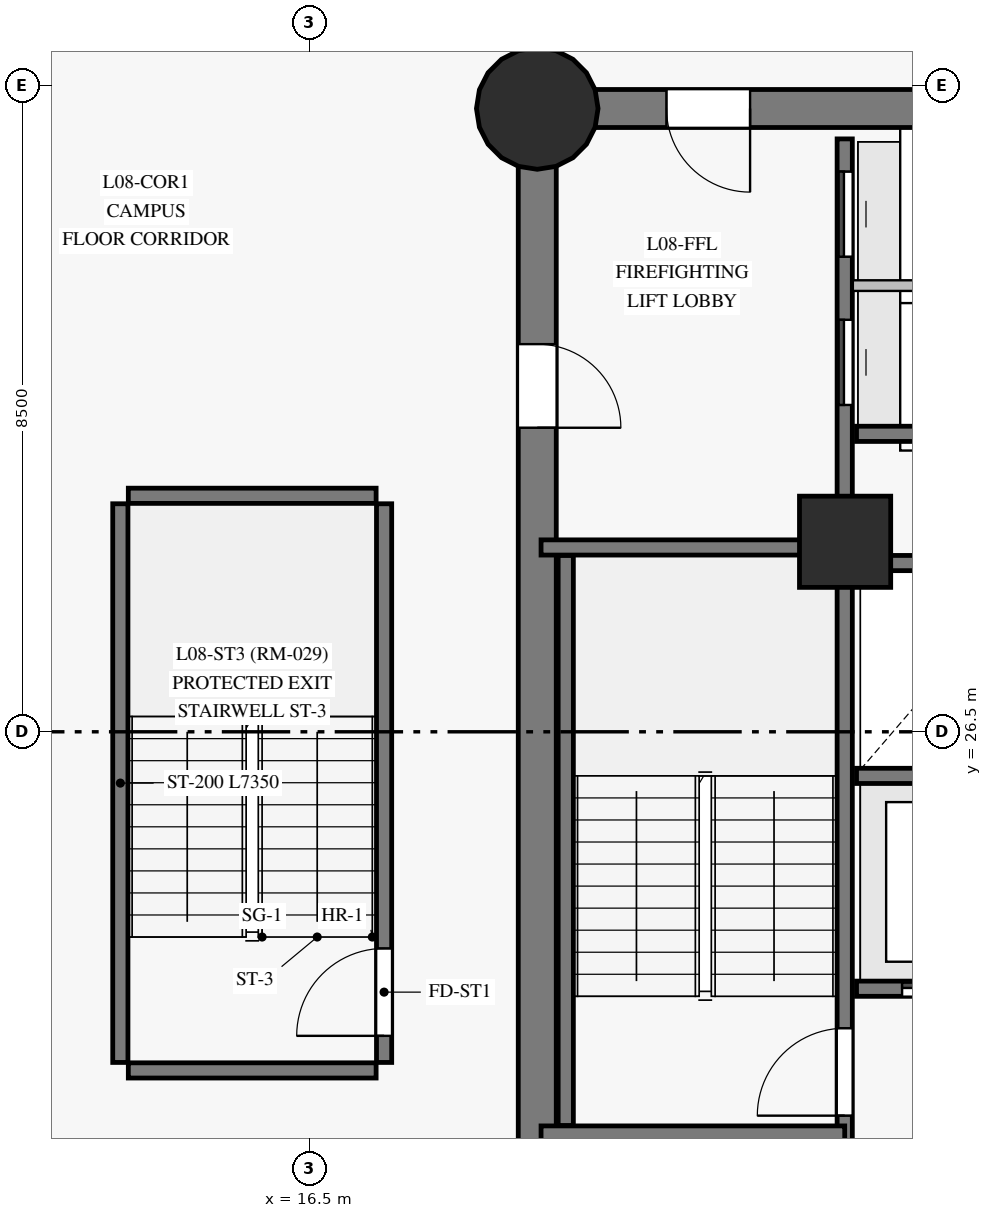
"""IFC4 building model, lengths in metres.
Left out: names, types, materials, properties, quantities, classifications, styles, units other than length and angle.
Written with IfcOpenShell. Run it as: python <this file> out.ifc"""

import sys

from ifc_helpers import new_model, si_unit, direction, frame, frame_2d, origin, origin_with_axes, origin_2d, place, context, subcontext, project, spatial, rectangle, circle, extrude, source, transform, mapped, element, fill, save


model = new_model("IFC4")
c1 = context("Model", 3, precision=1e-05, world=origin(), true_north=direction((0.0, 1.0)))
c2 = subcontext(c1, "Body", "Model", "MODEL_VIEW")
j1 = project(units=[si_unit("LENGTHUNIT", "METRE"), si_unit("PLANEANGLEUNIT", "RADIAN")], contexts=[c1])
p1 = place(None, origin())
s1 = spatial("IfcSite", under=j1, at=p1, CompositionType="ELEMENT")
p2 = place(p1, origin())
s2 = spatial("IfcBuilding", under=s1, at=p2, CompositionType="ELEMENT")
p3 = place(p2, frame((0.0, 0.0, 33.7)))
s3 = spatial("IfcBuildingStorey", under=s2, at=p3, CompositionType="ELEMENT", Elevation=33.7)
p4 = place(p3, frame((26.55, 34.7, 0.0), z_axis=(0.0, 0.0, 1.0), x_axis=(-1.0, 0.0, 0.0)))
e1 = element("IfcWall", 1, at=p4, inside=s3, PredefinedType="SHEAR", context=c2, shape_type="SweptSolid", body=[
    extrude(rectangle(XDim=7.05, YDim=0.5, at=frame_2d((3.525, 0.0))), origin(), (0.0, 0.0, 1.0), 3.35),
])
p5 = place(p4, frame((4.25, 0.0, 0.0)))
e2 = element("IfcOpeningElement", 2, at=p5, cuts=e1, PredefinedType="OPENING", context=c2, shape_type="SweptSolid", body=[
    extrude(rectangle(XDim=1.1, YDim=2.15, at=frame_2d((0.55, 1.075))), frame((0.0, 0.26, 0.0), z_axis=(0.0, -1.0, 0.0), x_axis=(1.0, 0.0, 0.0)), (0.0, 0.0, 1.0), 0.52),
])
p6 = place(p3, frame((19.5, 34.7, 0.0), z_axis=(0.0, 0.0, 1.0), x_axis=(0.0, -1.0, 0.0)))
e3 = element("IfcWall", 3, at=p6, inside=s3, PredefinedType="SHEAR", context=c2, shape_type="SweptSolid", body=[
    extrude(rectangle(XDim=16.4, YDim=0.5, at=frame_2d((8.2, 0.0))), origin(), (0.0, 0.0, 1.0), 3.35),
])
p7 = place(p6, frame((3.1, 0.0, 0.0)))
e4 = element("IfcOpeningElement", 4, at=p7, cuts=e3, PredefinedType="OPENING", context=c2, shape_type="SweptSolid", body=[
    extrude(rectangle(XDim=1.1, YDim=2.15, at=frame_2d((0.55, 1.075))), frame((0.0, 0.26, 0.0), z_axis=(0.0, -1.0, 0.0), x_axis=(1.0, 0.0, 0.0)), (0.0, 0.0, 1.0), 0.52),
])
m1 = source(origin_with_axes(), c2, "Body", "SweptSolid", [
    extrude(circle(Radius=0.8, at=origin_2d()), origin(), (0.0, 0.0, 1.0), 3.6),
])
p8 = place(p3, frame((19.5, 34.7, 0.0), z_axis=(0.0, 0.0, 1.0), x_axis=(1.0, 0.0, 0.0)))
e5 = element("IfcColumn", 5, at=p8, inside=s3, PredefinedType="COLUMN", context=c2, shape_type="MappedRepresentation", body=[
    mapped(m1, transform((0.0, 0.0, 0.0), scale=1.0)),
])
m2 = source(origin_with_axes(), c2, "Body", "SweptSolid", [
    extrude(rectangle(XDim=1.2, YDim=1.2, at=origin_2d()), origin(), (0.0, 0.0, 1.0), 3.6),
])
p9 = place(p3, frame((23.55, 29.0, 0.0), z_axis=(0.0, 0.0, 1.0), x_axis=(1.0, 0.0, 0.0)))
e6 = element("IfcColumn", 6, at=p9, inside=s3, PredefinedType="COLUMN", context=c2, shape_type="MappedRepresentation", body=[
    mapped(m2, transform((0.0, 0.0, 0.0), scale=1.0)),
])
p10 = place(p3, frame((23.545, 18.7, 0.0), z_axis=(0.0, 0.0, 1.0), x_axis=(0.0, 1.0, 0.0)))
e7 = element("IfcWall", 7, at=p10, inside=s3, PredefinedType="SHEAR", context=c2, shape_type="SweptSolid", body=[
    extrude(rectangle(XDim=15.6, YDim=0.2, at=frame_2d((7.8, 0.0))), origin(), (0.0, 0.0, 1.0), 3.35),
])
p11 = place(p10, frame((2.75, 0.0, 0.0)))
e8 = element("IfcOpeningElement", 8, at=p11, cuts=e7, PredefinedType="OPENING", context=c2, shape_type="SweptSolid", body=[
    extrude(rectangle(XDim=1.15, YDim=2.15, at=frame_2d((0.575, 1.075))), frame((0.0, 0.11, 0.0), z_axis=(0.0, -1.0, 0.0), x_axis=(1.0, 0.0, 0.0)), (0.0, 0.0, 1.0), 0.22),
])
p12 = place(p10, frame((0.14, 0.0, 0.0)))
e9 = element("IfcOpeningElement", 9, at=p12, cuts=e7, PredefinedType="OPENING", context=c2, shape_type="SweptSolid", body=[
    extrude(rectangle(XDim=0.88, YDim=2.1, at=frame_2d((0.44, 1.05))), frame((0.0, 0.11, 0.0), z_axis=(0.0, -1.0, 0.0), x_axis=(1.0, 0.0, 0.0)), (0.0, 0.0, 1.0), 0.22),
])
p13 = place(p10, frame((1.36, 0.0, 0.0)))
e10 = element("IfcOpeningElement", 10, at=p13, cuts=e7, PredefinedType="OPENING", context=c2, shape_type="SweptSolid", body=[
    extrude(rectangle(XDim=0.88, YDim=2.1, at=frame_2d((0.44, 1.05))), frame((0.0, 0.11, 0.0), z_axis=(0.0, -1.0, 0.0), x_axis=(1.0, 0.0, 0.0)), (0.0, 0.0, 1.0), 0.22),
])
p14 = place(p10, frame((12.1, 0.0, 0.0)))
e11 = element("IfcOpeningElement", 11, at=p14, cuts=e7, PredefinedType="OPENING", context=c2, shape_type="SweptSolid", body=[
    extrude(rectangle(XDim=1.12, YDim=2.15, at=frame_2d((0.56, 1.075))), frame((0.0, 0.11, 0.0), z_axis=(0.0, -1.0, 0.0), x_axis=(1.0, 0.0, 0.0)), (0.0, 0.0, 1.0), 0.22),
])
p15 = place(p10, frame((14.05, 0.0, 0.0)))
e12 = element("IfcOpeningElement", 12, at=p15, cuts=e7, PredefinedType="OPENING", context=c2, shape_type="SweptSolid", body=[
    extrude(rectangle(XDim=1.12, YDim=2.15, at=frame_2d((0.56, 1.075))), frame((0.0, 0.11, 0.0), z_axis=(0.0, -1.0, 0.0), x_axis=(1.0, 0.0, 0.0)), (0.0, 0.0, 1.0), 0.22),
])
p16 = place(p3, frame((23.7, 23.12, 0.0), z_axis=(0.0, 0.0, 1.0), x_axis=(1.0, 0.0, 0.0)))
e13 = element("IfcWall", 13, at=p16, inside=s3, PredefinedType="SHEAR", context=c2, shape_type="SweptSolid", body=[
    extrude(rectangle(XDim=9.6, YDim=0.2, at=frame_2d((4.8, 0.0))), origin(), (0.0, 0.0, 1.0), 3.35),
])
p17 = place(p16, frame((0.6, 0.0, 0.0)))
e14 = element("IfcOpeningElement", 14, at=p17, cuts=e13, PredefinedType="OPENING", context=c2, shape_type="SweptSolid", body=[
    extrude(rectangle(XDim=1.1, YDim=2.15, at=frame_2d((0.55, 1.075))), frame((0.0, 0.11, 0.0), z_axis=(0.0, -1.0, 0.0), x_axis=(1.0, 0.0, 0.0)), (0.0, 0.0, 1.0), 0.22),
])
p18 = place(p16, frame((2.98, 0.0, 0.0)))
e15 = element("IfcOpeningElement", 15, at=p18, cuts=e13, PredefinedType="OPENING", context=c2, shape_type="SweptSolid", body=[
    extrude(rectangle(XDim=1.1, YDim=2.15, at=frame_2d((0.55, 1.075))), frame((0.0, 0.11, 0.0), z_axis=(0.0, -1.0, 0.0), x_axis=(1.0, 0.0, 0.0)), (0.0, 0.0, 1.0), 0.22),
])
p19 = place(p16, frame((5.36, 0.0, 0.0)))
e16 = element("IfcOpeningElement", 16, at=p19, cuts=e13, PredefinedType="OPENING", context=c2, shape_type="SweptSolid", body=[
    extrude(rectangle(XDim=1.1, YDim=2.15, at=frame_2d((0.55, 1.075))), frame((0.0, 0.11, 0.0), z_axis=(0.0, -1.0, 0.0), x_axis=(1.0, 0.0, 0.0)), (0.0, 0.0, 1.0), 0.22),
])
p20 = place(p16, frame((7.74, 0.0, 0.0)))
e17 = element("IfcOpeningElement", 17, at=p20, cuts=e13, PredefinedType="OPENING", context=c2, shape_type="SweptSolid", body=[
    extrude(rectangle(XDim=1.1, YDim=2.15, at=frame_2d((0.55, 1.075))), frame((0.0, 0.11, 0.0), z_axis=(0.0, -1.0, 0.0), x_axis=(1.0, 0.0, 0.0)), (0.0, 0.0, 1.0), 0.22),
])
for number, where, z_axis, x_axis in (
    (18, (23.7, 25.92, 0.0), (0.0, 0.0, 1.0), (1.0, 0.0, 0.0)),
    (19, (23.7, 28.72, 0.0), (0.0, 0.0, 1.0), (1.0, 0.0, 0.0)),
):
    element("IfcWall", number, at=place(p3, frame(where, z_axis=z_axis, x_axis=x_axis)), inside=s3, PredefinedType="SHEAR", context=c2, shape_type="SweptSolid", body=[
        extrude(rectangle(XDim=9.6, YDim=0.2, at=frame_2d((4.8, 0.0))), origin(), (0.0, 0.0, 1.0), 3.35),
    ])
p21 = place(p3, frame((19.875, 21.32, 0.0), z_axis=(0.0, 0.0, 1.0), x_axis=(0.0, 1.0, 0.0)))
e20 = element("IfcWall", 20, at=p21, inside=s3, PredefinedType="SHEAR", context=c2, shape_type="SweptSolid", body=[
    extrude(rectangle(XDim=7.5, YDim=0.2, at=frame_2d((3.75, 0.0))), origin(), (0.0, 0.0, 1.0), 3.35),
])
p22 = place(p3, frame((14.015, 22.15, 0.0), z_axis=(0.0, 0.0, 1.0), x_axis=(0.0, 1.0, 0.0)))
e21 = element("IfcWall", 21, at=p22, inside=s3, PredefinedType="SHEAR", context=c2, shape_type="SweptSolid", body=[
    extrude(rectangle(XDim=7.35, YDim=0.2, at=frame_2d((3.675, 0.0))), origin(), (0.0, 0.0, 1.0), 3.35),
])
p23 = place(p3, frame((17.485, 22.15, 0.0), z_axis=(0.0, 0.0, 1.0), x_axis=(0.0, 1.0, 0.0)))
e22 = element("IfcWall", 22, at=p23, inside=s3, PredefinedType="SHEAR", context=c2, shape_type="SweptSolid", body=[
    extrude(rectangle(XDim=7.35, YDim=0.2, at=frame_2d((3.675, 0.0))), origin(), (0.0, 0.0, 1.0), 3.35),
])
p24 = place(p23, frame((0.35, 0.0, 0.0)))
e23 = element("IfcOpeningElement", 23, at=p24, cuts=e22, PredefinedType="OPENING", context=c2, shape_type="SweptSolid", body=[
    extrude(rectangle(XDim=1.15, YDim=2.15, at=frame_2d((0.575, 1.075))), frame((0.0, 0.11, 0.0), z_axis=(0.0, -1.0, 0.0), x_axis=(1.0, 0.0, 0.0)), (0.0, 0.0, 1.0), 0.22),
])
for number, where, z_axis, x_axis in (
    (24, (19.55, 21.215, 0.0), (0.0, 0.0, 1.0), (1.0, 0.0, 0.0)),
    (25, (19.55, 28.925, 0.0), (0.0, 0.0, 1.0), (1.0, 0.0, 0.0)),
):
    element("IfcWall", number, at=place(p3, frame(where, z_axis=z_axis, x_axis=x_axis)), inside=s3, PredefinedType="SHEAR", context=c2, shape_type="SweptSolid", body=[
        extrude(rectangle(XDim=3.995, YDim=0.2, at=frame_2d((1.998, 0.0))), origin(), (0.0, 0.0, 1.0), 3.35),
    ])
for number, where, z_axis, x_axis in (
    (26, (14.12, 22.045, 0.0), (0.0, 0.0, 1.0), (1.0, 0.0, 0.0)),
    (27, (14.12, 29.605, 0.0), (0.0, 0.0, 1.0), (1.0, 0.0, 0.0)),
):
    element("IfcWall", number, at=place(p3, frame(where, z_axis=z_axis, x_axis=x_axis)), inside=s3, PredefinedType="SHEAR", context=c2, shape_type="SweptSolid", body=[
        extrude(rectangle(XDim=3.26, YDim=0.2, at=frame_2d((1.63, 0.0))), origin(), (0.0, 0.0, 1.0), 3.35),
    ])
p25 = place(p3, frame((23.7, 30.42, 0.0), z_axis=(0.0, 0.0, 1.0), x_axis=(1.0, 0.0, 0.0)))
e28 = element("IfcWall", 28, at=p25, inside=s3, PredefinedType="SHEAR", context=c2, shape_type="SweptSolid", body=[
    extrude(rectangle(XDim=2.78, YDim=0.2, at=frame_2d((1.39, 0.0))), origin(), (0.0, 0.0, 1.0), 3.35),
])
p26 = place(p3, frame((23.652, 32.37, 0.0), z_axis=(0.0, 0.0, 1.0), x_axis=(1.0, 0.0, 0.0)))
e29 = element("IfcWall", 29, at=p26, inside=s3, PredefinedType="PARTITIONING", context=c2, shape_type="SweptSolid", body=[
    extrude(rectangle(XDim=2.828, YDim=0.14, at=frame_2d((1.414, 0.0))), origin(), (0.0, 0.0, 1.0), 3.35),
])
m3 = source(origin_with_axes(), c2, "Body", "SweptSolid", [
    extrude(rectangle(XDim=1.15, YDim=2.15, at=frame_2d((0.575, 1.075))), frame((0.0, 0.025, 0.0), z_axis=(0.0, -1.0, 0.0), x_axis=(1.0, 0.0, 0.0)), (0.0, 0.0, 1.0), 0.05),
])
p27 = place(p11, origin())
e30 = element("IfcDoor", 30, at=p27, inside=s3, OperationType="SINGLE_SWING_LEFT", PredefinedType="DOOR", context=c2, shape_type="MappedRepresentation", body=[
    mapped(m3, transform((0.0, 0.0, 0.0), scale=1.0)),
])
fill(e8, e30)
m4 = source(origin_with_axes(), c2, "Body", "SweptSolid", [
    extrude(rectangle(XDim=1.1, YDim=2.15, at=frame_2d((0.55, 1.075))), frame((0.0, 0.025, 0.0), z_axis=(0.0, -1.0, 0.0), x_axis=(1.0, 0.0, 0.0)), (0.0, 0.0, 1.0), 0.05),
])
p28 = place(p5, origin())
e31 = element("IfcDoor", 31, at=p28, inside=s3, OperationType="SINGLE_SWING_LEFT", PredefinedType="DOOR", context=c2, shape_type="MappedRepresentation", body=[
    mapped(m4, transform((0.0, 0.0, 0.0), scale=1.0)),
])
fill(e2, e31)
p29 = place(p7, origin())
e32 = element("IfcDoor", 32, at=p29, inside=s3, OperationType="SINGLE_SWING_RIGHT", PredefinedType="DOOR", context=c2, shape_type="MappedRepresentation", body=[
    mapped(m4, transform((0.0, 0.0, 0.0), scale=1.0)),
])
fill(e4, e32)
p30 = place(p17, origin())
e33 = element("IfcDoor", 33, at=p30, inside=s3, OperationType="SLIDING_TO_LEFT", PredefinedType="DOOR", context=c2, shape_type="MappedRepresentation", body=[
    mapped(m4, transform((0.0, 0.0, 0.0), scale=1.0)),
])
fill(e14, e33)
m5 = source(origin_with_axes(), c2, "Body", "SweptSolid", [
    extrude(rectangle(XDim=1.12, YDim=2.15, at=frame_2d((0.56, 1.075))), frame((0.0, 0.025, 0.0), z_axis=(0.0, -1.0, 0.0), x_axis=(1.0, 0.0, 0.0)), (0.0, 0.0, 1.0), 0.05),
])
p31 = place(p14, origin())
e34 = element("IfcDoor", 34, at=p31, inside=s3, OperationType="SLIDING_TO_LEFT", PredefinedType="DOOR", context=c2, shape_type="MappedRepresentation", body=[
    mapped(m5, transform((0.0, 0.0, 0.0), scale=1.0)),
])
fill(e11, e34)
p32 = place(p15, origin())
e35 = element("IfcDoor", 35, at=p32, inside=s3, OperationType="SLIDING_TO_RIGHT", PredefinedType="DOOR", context=c2, shape_type="MappedRepresentation", body=[
    mapped(m5, transform((0.0, 0.0, 0.0), scale=1.0)),
])
fill(e12, e35)
p33 = place(p24, origin())
e36 = element("IfcDoor", 36, at=p33, inside=s3, OperationType="SINGLE_SWING_LEFT", PredefinedType="DOOR", context=c2, shape_type="MappedRepresentation", body=[
    mapped(m3, transform((0.0, 0.0, 0.0), scale=1.0)),
])
fill(e23, e36)
save(model, sys.argv[1])
